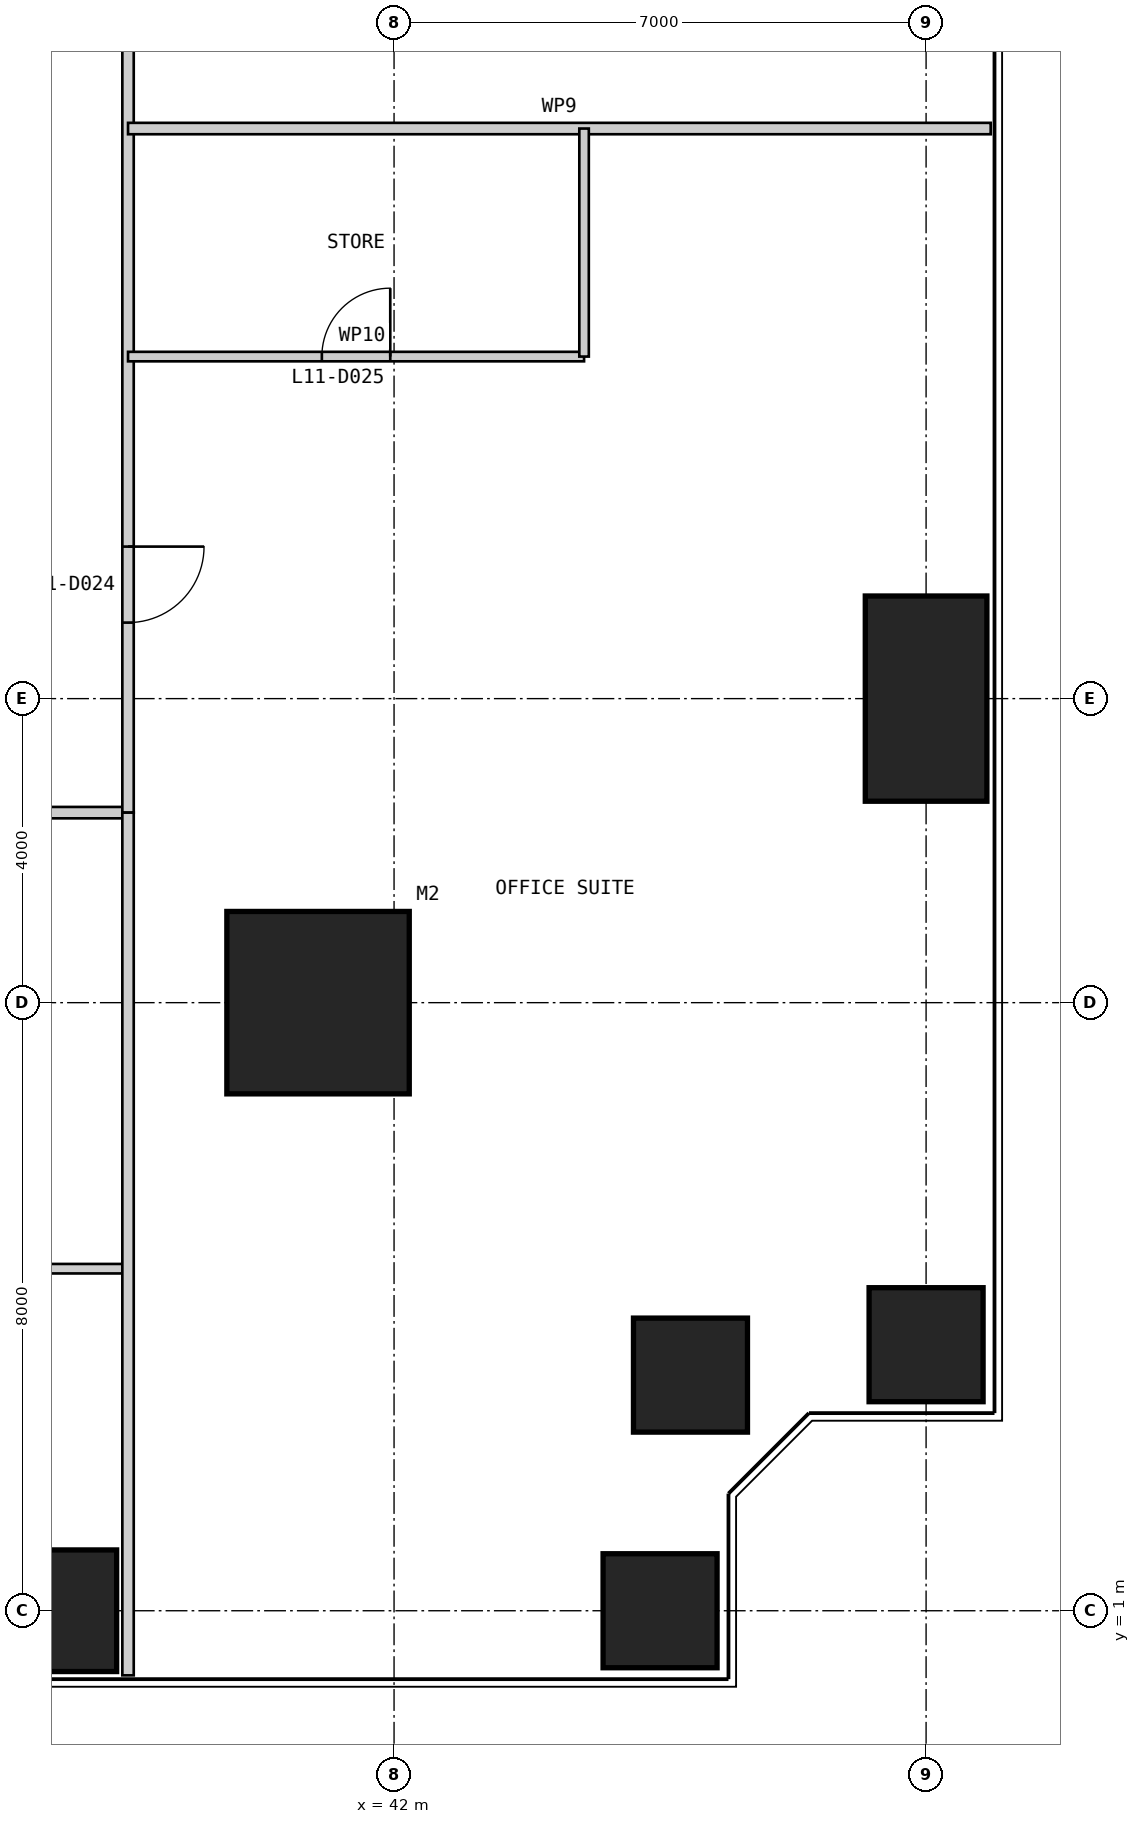
"""IFC4 building model, lengths in metres.
Left out: names, types, materials, properties, quantities, classifications, styles, units other than length and angle.
Written with IfcOpenShell. Run it as: python <this file> out.ifc"""

import sys

from ifc_helpers import new_model, si_unit, direction, frame, frame_2d, origin, origin_2d, place, context, subcontext, project, spatial, rectangle, extrude, element, fill, save


model = new_model("IFC4")
c1 = context("Model", 3, precision=1e-05, world=origin(), true_north=direction((0.0, 1.0)))
c2 = subcontext(c1, "Body", "Model", "MODEL_VIEW")
j1 = project(units=[si_unit("LENGTHUNIT", "METRE"), si_unit("PLANEANGLEUNIT", "RADIAN")], contexts=[c1])
p1 = place(None, origin())
s1 = spatial("IfcSite", under=j1, at=p1, CompositionType="ELEMENT")
p2 = place(p1, origin())
s2 = spatial("IfcBuilding", under=s1, at=p2, CompositionType="ELEMENT")
p3 = place(p2, frame((0.0, 0.0, 51.0)))
s3 = spatial("IfcBuildingStorey", under=s2, at=p3, CompositionType="ELEMENT", Elevation=51.0)
p4 = place(p3, frame((41.0, 9.0, 0.0), z_axis=(0.0, 0.0, 1.0), x_axis=(1.0, 0.0, 0.0)))
e1 = element("IfcColumn", 1, at=p4, inside=s3, PredefinedType="COLUMN", context=c2, shape_type="SweptSolid", body=[
    extrude(rectangle(XDim=2.4, YDim=2.4, at=origin_2d()), origin(), (0.0, 0.0, 1.0), 4.0),
])
p5 = place(p3, frame((37.0, 1.0, 0.0), z_axis=(0.0, 0.0, 1.0), x_axis=(1.0, 0.0, 0.0)))
e2 = element("IfcColumn", 2, at=p5, inside=s3, PredefinedType="COLUMN", context=c2, shape_type="SweptSolid", body=[
    extrude(rectangle(XDim=2.7, YDim=1.6, at=origin_2d()), origin(), (0.0, 0.0, 1.0), 4.0),
])
for number, where, z_axis, x_axis in (
    (3, (45.5, 1.0, 0.0), (0.0, 0.0, 1.0), (1.0, 0.0, 0.0)),
    (4, (45.9, 4.1, 0.0), (0.0, 0.0, 1.0), (1.0, 0.0, 0.0)),
    (5, (49.0, 4.5, 0.0), (0.0, 0.0, 1.0), (1.0, 0.0, 0.0)),
):
    element("IfcColumn", number, at=place(p3, frame(where, z_axis=z_axis, x_axis=x_axis)), inside=s3, PredefinedType="COLUMN", context=c2, shape_type="SweptSolid", body=[
        extrude(rectangle(XDim=1.5, YDim=1.5, at=origin_2d()), origin(), (0.0, 0.0, 1.0), 4.0),
    ])
p6 = place(p3, frame((49.0, 13.0, 0.0), z_axis=(0.0, 0.0, 1.0), x_axis=(1.0, 0.0, 0.0)))
e6 = element("IfcColumn", 6, at=p6, inside=s3, PredefinedType="COLUMN", context=c2, shape_type="SweptSolid", body=[
    extrude(rectangle(XDim=1.6, YDim=2.7, at=origin_2d()), origin(), (0.0, 0.0, 1.0), 4.0),
])
p7 = place(p3, frame((11.5, 11.5, 0.0), z_axis=(0.0, 0.0, 1.0), x_axis=(1.0, 0.0, 0.0)))
e7 = element("IfcWall", 7, at=p7, inside=s3, PredefinedType="PARTITIONING", context=c2, shape_type="SweptSolid", body=[
    extrude(rectangle(XDim=27.0, YDim=0.15, at=frame_2d((13.5, 0.0))), origin(), (0.0, 0.0, 1.0), 3.85),
])
p8 = place(p7, frame((2.5, 0.0, 0.0)))
e8 = element("IfcOpeningElement", 8, at=p8, cuts=e7, PredefinedType="OPENING", context=c2, shape_type="SweptSolid", body=[
    extrude(rectangle(XDim=1.0, YDim=2.2, at=frame_2d((0.5, 1.1))), frame((0.0, 0.085, 0.0), z_axis=(0.0, -1.0, 0.0), x_axis=(1.0, 0.0, 0.0)), (0.0, 0.0, 1.0), 0.17),
])
p9 = place(p7, frame((16.0, 0.0, 0.0)))
e9 = element("IfcOpeningElement", 9, at=p9, cuts=e7, PredefinedType="OPENING", context=c2, shape_type="SweptSolid", body=[
    extrude(rectangle(XDim=1.0, YDim=2.2, at=frame_2d((0.5, 1.1))), frame((0.0, 0.085, 0.0), z_axis=(0.0, -1.0, 0.0), x_axis=(1.0, 0.0, 0.0)), (0.0, 0.0, 1.0), 0.17),
])
p10 = place(p3, frame((32.5, 5.5, 0.0), z_axis=(0.0, 0.0, 1.0), x_axis=(1.0, 0.0, 0.0)))
e10 = element("IfcWall", 10, at=p10, inside=s3, PredefinedType="PARTITIONING", context=c2, shape_type="SweptSolid", body=[
    extrude(rectangle(XDim=6.0, YDim=0.125, at=frame_2d((3.0, 0.0))), origin(), (0.0, 0.0, 1.0), 3.85),
])
p11 = place(p3, frame((38.5, 11.5, 0.0), z_axis=(0.0, 0.0, 1.0), x_axis=(0.0, 1.0, 0.0)))
e11 = element("IfcWall", 11, at=p11, inside=s3, PredefinedType="PARTITIONING", context=c2, shape_type="SweptSolid", body=[
    extrude(rectangle(XDim=27.0, YDim=0.15, at=frame_2d((13.5, 0.0))), origin(), (0.0, 0.0, 1.0), 3.85),
])
p12 = place(p11, frame((2.5, 0.0, 0.0)))
e12 = element("IfcOpeningElement", 12, at=p12, cuts=e11, PredefinedType="OPENING", context=c2, shape_type="SweptSolid", body=[
    extrude(rectangle(XDim=1.0, YDim=2.2, at=frame_2d((0.5, 1.1))), frame((0.0, 0.085, 0.0), z_axis=(0.0, -1.0, 0.0), x_axis=(1.0, 0.0, 0.0)), (0.0, 0.0, 1.0), 0.17),
])
p13 = place(p11, frame((16.0, 0.0, 0.0)))
e13 = element("IfcOpeningElement", 13, at=p13, cuts=e11, PredefinedType="OPENING", context=c2, shape_type="SweptSolid", body=[
    extrude(rectangle(XDim=1.0, YDim=2.2, at=frame_2d((0.5, 1.1))), frame((0.0, 0.085, 0.0), z_axis=(0.0, -1.0, 0.0), x_axis=(1.0, 0.0, 0.0)), (0.0, 0.0, 1.0), 0.17),
])
p14 = place(p3, frame((38.5, 0.15, 0.0), z_axis=(0.0, 0.0, 1.0), x_axis=(0.0, 1.0, 0.0)))
e14 = element("IfcWall", 14, at=p14, inside=s3, PredefinedType="PARTITIONING", context=c2, shape_type="SweptSolid", body=[
    extrude(rectangle(XDim=11.35, YDim=0.15, at=frame_2d((5.675, 0.0))), origin(), (0.0, 0.0, 1.0), 3.85),
])
p15 = place(p3, frame((44.5, 17.5, 0.0), z_axis=(0.0, 0.0, 1.0), x_axis=(-1.0, 0.0, 0.0)))
e15 = element("IfcWall", 15, at=p15, inside=s3, PredefinedType="PARTITIONING", context=c2, shape_type="SweptSolid", body=[
    extrude(rectangle(XDim=6.0, YDim=0.125, at=frame_2d((3.0, 0.0))), origin(), (0.0, 0.0, 1.0), 3.85),
])
p16 = place(p15, frame((2.55, 0.0, 0.0)))
e16 = element("IfcOpeningElement", 16, at=p16, cuts=e15, PredefinedType="OPENING", context=c2, shape_type="SweptSolid", body=[
    extrude(rectangle(XDim=0.9, YDim=2.2, at=frame_2d((0.45, 1.1))), frame((0.0, 0.073, 0.0), z_axis=(0.0, -1.0, 0.0), x_axis=(1.0, 0.0, 0.0)), (0.0, 0.0, 1.0), 0.145),
])
p17 = place(p3, frame((49.85, 20.5, 0.0), z_axis=(0.0, 0.0, 1.0), x_axis=(-1.0, 0.0, 0.0)))
e17 = element("IfcWall", 17, at=p17, inside=s3, PredefinedType="PARTITIONING", context=c2, shape_type="SweptSolid", body=[
    extrude(rectangle(XDim=11.35, YDim=0.15, at=frame_2d((5.675, 0.0))), origin(), (0.0, 0.0, 1.0), 3.85),
])
p18 = place(p3, frame((44.5, 17.5, 0.0), z_axis=(0.0, 0.0, 1.0), x_axis=(0.0, 1.0, 0.0)))
e18 = element("IfcWall", 18, at=p18, inside=s3, PredefinedType="PARTITIONING", context=c2, shape_type="SweptSolid", body=[
    extrude(rectangle(XDim=3.0, YDim=0.125, at=frame_2d((1.5, 0.0))), origin(), (0.0, 0.0, 1.0), 3.85),
])
p19 = place(p12, frame((1.0, 0.0, 0.0), z_axis=(0.0, 0.0, 1.0), x_axis=(-1.0, 0.0, 0.0)))
e19 = element("IfcDoor", 19, at=p19, inside=s3, OperationType="SINGLE_SWING_LEFT", PredefinedType="DOOR", context=c2, shape_type="SweptSolid", body=[
    extrude(rectangle(XDim=1.0, YDim=2.2, at=frame_2d((0.5, 1.1))), frame((0.0, 0.025, 0.0), z_axis=(0.0, -1.0, 0.0), x_axis=(1.0, 0.0, 0.0)), (0.0, 0.0, 1.0), 0.05),
])
fill(e12, e19)
p20 = place(p16, frame((0.9, 0.0, 0.0), z_axis=(0.0, 0.0, 1.0), x_axis=(-1.0, 0.0, 0.0)))
e20 = element("IfcDoor", 20, at=p20, inside=s3, OperationType="SINGLE_SWING_RIGHT", PredefinedType="DOOR", context=c2, shape_type="SweptSolid", body=[
    extrude(rectangle(XDim=0.9, YDim=2.2, at=frame_2d((0.45, 1.1))), frame((0.0, 0.025, 0.0), z_axis=(0.0, -1.0, 0.0), x_axis=(1.0, 0.0, 0.0)), (0.0, 0.0, 1.0), 0.05),
])
fill(e16, e20)
save(model, sys.argv[1])
